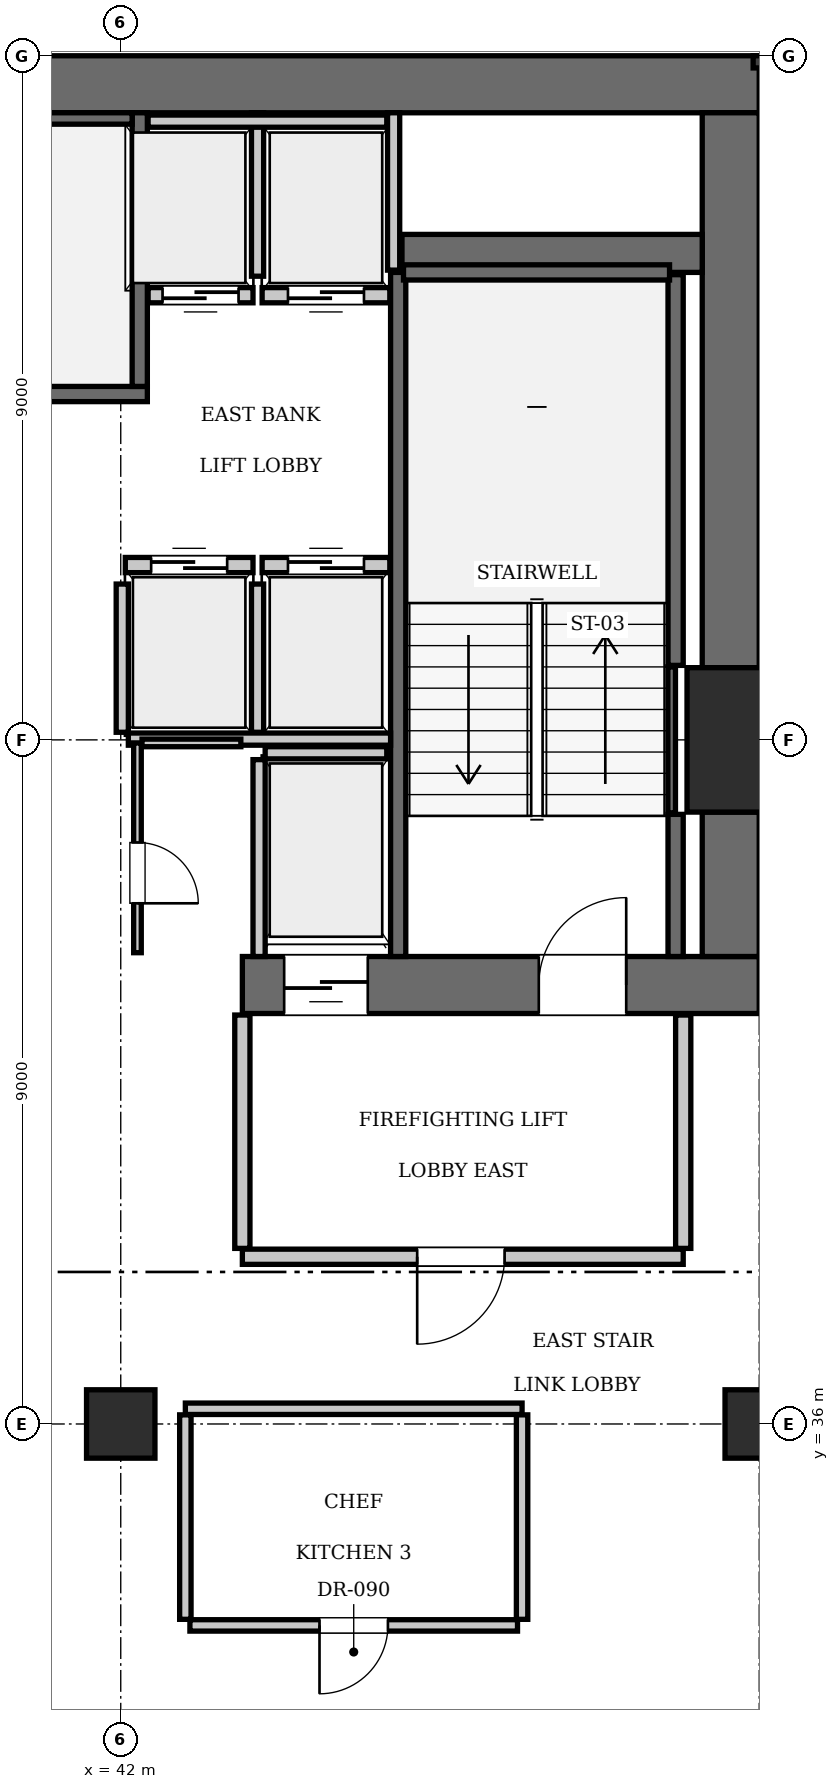
"""IFC4 building model, lengths in metres.
Left out: names, types, materials, properties, quantities, classifications, styles, units other than length and angle.
Written with IfcOpenShell. Run it as: python <this file> out.ifc"""

import sys

from ifc_helpers import new_model, si_unit, direction, frame, frame_2d, origin, origin_2d, place, context, subcontext, project, spatial, rectangle, extrude, element, fill, save


model = new_model("IFC4")
c1 = context("Model", 3, precision=1e-05, world=origin(), true_north=direction((0.0, 1.0)))
c2 = subcontext(c1, "Body", "Model", "MODEL_VIEW")
j1 = project(units=[si_unit("LENGTHUNIT", "METRE"), si_unit("PLANEANGLEUNIT", "RADIAN")], contexts=[c1])
p1 = place(None, origin())
s1 = spatial("IfcSite", under=j1, at=p1, CompositionType="ELEMENT")
p2 = place(p1, origin())
s2 = spatial("IfcBuilding", under=s1, at=p2, CompositionType="ELEMENT")
p3 = place(p2, frame((0.0, 0.0, 165.9)))
s3 = spatial("IfcBuildingStorey", under=s2, at=p3, CompositionType="ELEMENT", Elevation=165.9)
p4 = place(p3, frame((50.4, 45.0, 0.0), z_axis=(0.0, 0.0, 1.0), x_axis=(1.0, 0.0, 0.0)))
e1 = element("IfcColumn", 1, at=p4, inside=s3, PredefinedType="COLUMN", context=c2, shape_type="SweptSolid", body=[
    extrude(rectangle(XDim=1.9, YDim=1.9, at=origin_2d()), origin(), (0.0, 0.0, 1.0), 3.85),
])
p5 = place(p3, frame((25.2, 53.625, 0.0), z_axis=(0.0, 0.0, 1.0), x_axis=(1.0, 0.0, 0.0)))
e2 = element("IfcWall", 2, at=p5, inside=s3, PredefinedType="SHEAR", context=c2, shape_type="SweptSolid", body=[
    extrude(rectangle(XDim=25.2, YDim=0.75, at=frame_2d((12.6, 0.0))), origin(), (0.0, 0.0, 1.0), 3.85),
])
p6 = place(p3, frame((43.6, 41.775, 0.0), z_axis=(0.0, 0.0, 1.0), x_axis=(1.0, 0.0, 0.0)))
e3 = element("IfcWall", 3, at=p6, inside=s3, PredefinedType="SHEAR", context=c2, shape_type="SweptSolid", body=[
    extrude(rectangle(XDim=6.8, YDim=0.75, at=frame_2d((3.4, 0.0))), origin(), (0.0, 0.0, 1.0), 3.85),
])
p7 = place(p6, frame((3.9, 0.0, 0.0)))
e4 = element("IfcOpeningElement", 4, at=p7, cuts=e3, PredefinedType="OPENING", context=c2, shape_type="SweptSolid", body=[
    extrude(rectangle(XDim=1.15, YDim=2.15, at=frame_2d((0.575, 1.075))), frame((0.0, 0.385, 0.0), z_axis=(0.0, -1.0, 0.0), x_axis=(1.0, 0.0, 0.0)), (0.0, 0.0, 1.0), 0.77),
])
p8 = place(p6, frame((0.55, 0.0, 0.0)))
e5 = element("IfcOpeningElement", 5, at=p8, cuts=e3, PredefinedType="OPENING", context=c2, shape_type="SweptSolid", body=[
    extrude(rectangle(XDim=1.1, YDim=2.2, at=frame_2d((0.55, 1.1))), frame((0.0, 0.385, 0.0), z_axis=(0.0, -1.0, 0.0), x_axis=(1.0, 0.0, 0.0)), (0.0, 0.0, 1.0), 0.77),
])
p9 = place(p3, frame((50.025, 42.15, 0.0), z_axis=(0.0, 0.0, 1.0), x_axis=(0.0, 1.0, 0.0)))
e6 = element("IfcWall", 6, at=p9, inside=s3, PredefinedType="SHEAR", context=c2, shape_type="SweptSolid", body=[
    extrude(rectangle(XDim=1.9, YDim=0.75, at=frame_2d((0.95, 0.0))), origin(), (0.0, 0.0, 1.0), 3.85),
])
p10 = place(p3, frame((50.025, 45.95, 0.0), z_axis=(0.0, 0.0, 1.0), x_axis=(0.0, 1.0, 0.0)))
e7 = element("IfcWall", 7, at=p10, inside=s3, PredefinedType="SHEAR", context=c2, shape_type="SweptSolid", body=[
    extrude(rectangle(XDim=7.3, YDim=0.75, at=frame_2d((3.65, 0.0))), origin(), (0.0, 0.0, 1.0), 3.85),
])
p11 = place(p3, frame((45.7, 51.4, 0.0), z_axis=(0.0, 0.0, 1.0), x_axis=(1.0, 0.0, 0.0)))
e8 = element("IfcWall", 8, at=p11, inside=s3, PredefinedType="SHEAR", context=c2, shape_type="SweptSolid", body=[
    extrude(rectangle(XDim=3.95, YDim=0.5, at=frame_2d((1.975, 0.0))), origin(), (0.0, 0.0, 1.0), 3.85),
])
for number, where, z_axis, x_axis in (
    (9, (42.0, 36.0, 0.0), (0.0, 0.0, 1.0), (1.0, 0.0, 0.0)),
    (10, (50.4, 36.0, 0.0), (0.0, 0.0, 1.0), (1.0, 0.0, 0.0)),
):
    element("IfcColumn", number, at=place(p3, frame(where, z_axis=z_axis, x_axis=x_axis)), inside=s3, PredefinedType="COLUMN", context=c2, shape_type="SweptSolid", body=[
        extrude(rectangle(XDim=0.9, YDim=0.9, at=origin_2d()), origin(), (0.0, 0.0, 1.0), 3.85),
    ])
p12 = place(p3, frame((33.25, 49.55, 0.0), z_axis=(0.0, 0.0, 1.0), x_axis=(1.0, 0.0, 0.0)))
e11 = element("IfcWall", 11, at=p12, inside=s3, PredefinedType="SOLIDWALL", context=c2, shape_type="SweptSolid", body=[
    extrude(rectangle(XDim=9.1, YDim=0.2, at=frame_2d((4.55, 0.0))), origin(), (0.0, 0.0, 1.0), 3.61),
])
p13 = place(p3, frame((42.25, 49.65, 0.0), z_axis=(0.0, 0.0, 1.0), x_axis=(0.0, 1.0, 0.0)))
e12 = element("IfcWall", 12, at=p13, inside=s3, PredefinedType="SOLIDWALL", context=c2, shape_type="SweptSolid", body=[
    extrude(rectangle(XDim=3.6, YDim=0.2, at=frame_2d((1.8, 0.0))), origin(), (0.0, 0.0, 1.0), 3.61),
])
p14 = place(p3, frame((33.45, 53.175, 0.0), z_axis=(0.0, 0.0, 1.0), x_axis=(1.0, 0.0, 0.0)))
e13 = element("IfcWall", 13, at=p14, inside=s3, PredefinedType="SOLIDWALL", context=c2, shape_type="SweptSolid", body=[
    extrude(rectangle(XDim=8.7, YDim=0.15, at=frame_2d((4.35, 0.0))), origin(), (0.0, 0.0, 1.0), 3.61),
])
p15 = place(p3, frame((45.65, 42.15, 0.0), z_axis=(0.0, 0.0, 1.0), x_axis=(0.0, 1.0, 0.0)))
e14 = element("IfcWall", 14, at=p15, inside=s3, PredefinedType="SOLIDWALL", context=c2, shape_type="SweptSolid", body=[
    extrude(rectangle(XDim=9.0, YDim=0.2, at=frame_2d((4.5, 0.0))), origin(), (0.0, 0.0, 1.0), 3.61),
])
p16 = place(p3, frame((49.3, 42.15, 0.0), z_axis=(0.0, 0.0, 1.0), x_axis=(0.0, 1.0, 0.0)))
e15 = element("IfcWall", 15, at=p16, inside=s3, PredefinedType="SOLIDWALL", context=c2, shape_type="SweptSolid", body=[
    extrude(rectangle(XDim=1.87, YDim=0.2, at=frame_2d((0.935, 0.0))), origin(), (0.0, 0.0, 1.0), 3.61),
])
p17 = place(p3, frame((49.3, 45.98, 0.0), z_axis=(0.0, 0.0, 1.0), x_axis=(0.0, 1.0, 0.0)))
e16 = element("IfcWall", 16, at=p17, inside=s3, PredefinedType="SOLIDWALL", context=c2, shape_type="SweptSolid", body=[
    extrude(rectangle(XDim=5.14, YDim=0.2, at=frame_2d((2.57, 0.0))), origin(), (0.0, 0.0, 1.0), 3.61),
])
p18 = place(p3, frame((45.72, 51.15, 0.0), z_axis=(0.0, 0.0, 1.0), x_axis=(1.0, 0.0, 0.0)))
e17 = element("IfcWall", 17, at=p18, inside=s3, PredefinedType="SOLIDWALL", context=c2, shape_type="SweptSolid", body=[
    extrude(rectangle(XDim=3.5, YDim=0.2, at=frame_2d((1.75, 0.0))), origin(), (0.0, 0.0, 1.0), 3.61),
])
p19 = place(p3, frame((49.248, 44.04, 0.0), z_axis=(0.0, 0.0, 1.0), x_axis=(0.0, 1.0, 0.0)))
e18 = element("IfcWall", 18, at=p19, inside=s3, PredefinedType="SOLIDWALL", context=c2, shape_type="SweptSolid", body=[
    extrude(rectangle(XDim=1.92, YDim=0.1, at=frame_2d((0.96, 0.0))), origin(), (0.0, 0.0, 1.0), 3.61),
])
p20 = place(p3, frame((42.06, 47.3, 0.0), z_axis=(0.0, 0.0, 1.0), x_axis=(1.0, 0.0, 0.0)))
e19 = element("IfcWall", 19, at=p20, inside=s3, PredefinedType="SOLIDWALL", context=c2, shape_type="SweptSolid", body=[
    extrude(rectangle(XDim=1.68, YDim=0.2, at=frame_2d((0.84, 0.0))), origin(), (0.0, 0.0, 1.0), 3.61),
])
p21 = place(p20, frame((0.34, 0.0, 0.0)))
e20 = element("IfcOpeningElement", 20, at=p21, cuts=e19, PredefinedType="OPENING", context=c2, shape_type="SweptSolid", body=[
    extrude(rectangle(XDim=1.0, YDim=2.15, at=frame_2d((0.5, 1.075))), frame((0.0, 0.11, 0.0), z_axis=(0.0, -1.0, 0.0), x_axis=(1.0, 0.0, 0.0)), (0.0, 0.0, 1.0), 0.22),
])
p22 = place(p3, frame((43.86, 47.3, 0.0), z_axis=(0.0, 0.0, 1.0), x_axis=(1.0, 0.0, 0.0)))
e21 = element("IfcWall", 21, at=p22, inside=s3, PredefinedType="SOLIDWALL", context=c2, shape_type="SweptSolid", body=[
    extrude(rectangle(XDim=1.68, YDim=0.2, at=frame_2d((0.84, 0.0))), origin(), (0.0, 0.0, 1.0), 3.61),
])
p23 = place(p22, frame((0.34, 0.0, 0.0)))
e22 = element("IfcOpeningElement", 22, at=p23, cuts=e21, PredefinedType="OPENING", context=c2, shape_type="SweptSolid", body=[
    extrude(rectangle(XDim=1.0, YDim=2.15, at=frame_2d((0.5, 1.075))), frame((0.0, 0.11, 0.0), z_axis=(0.0, -1.0, 0.0), x_axis=(1.0, 0.0, 0.0)), (0.0, 0.0, 1.0), 0.22),
])
p24 = place(p3, frame((42.36, 50.85, 0.0), z_axis=(0.0, 0.0, 1.0), x_axis=(1.0, 0.0, 0.0)))
e23 = element("IfcWall", 23, at=p24, inside=s3, PredefinedType="SOLIDWALL", context=c2, shape_type="SweptSolid", body=[
    extrude(rectangle(XDim=1.38, YDim=0.2, at=frame_2d((0.69, 0.0))), origin(), (0.0, 0.0, 1.0), 3.61),
])
p25 = place(p24, frame((0.19, 0.0, 0.0)))
e24 = element("IfcOpeningElement", 24, at=p25, cuts=e23, PredefinedType="OPENING", context=c2, shape_type="SweptSolid", body=[
    extrude(rectangle(XDim=1.0, YDim=2.15, at=frame_2d((0.5, 1.075))), frame((0.0, 0.11, 0.0), z_axis=(0.0, -1.0, 0.0), x_axis=(1.0, 0.0, 0.0)), (0.0, 0.0, 1.0), 0.22),
])
p26 = place(p3, frame((43.86, 50.85, 0.0), z_axis=(0.0, 0.0, 1.0), x_axis=(1.0, 0.0, 0.0)))
e25 = element("IfcWall", 25, at=p26, inside=s3, PredefinedType="SOLIDWALL", context=c2, shape_type="SweptSolid", body=[
    extrude(rectangle(XDim=1.68, YDim=0.2, at=frame_2d((0.84, 0.0))), origin(), (0.0, 0.0, 1.0), 3.61),
])
p27 = place(p26, frame((0.34, 0.0, 0.0)))
e26 = element("IfcOpeningElement", 26, at=p27, cuts=e25, PredefinedType="OPENING", context=c2, shape_type="SweptSolid", body=[
    extrude(rectangle(XDim=1.0, YDim=2.15, at=frame_2d((0.5, 1.075))), frame((0.0, 0.11, 0.0), z_axis=(0.0, -1.0, 0.0), x_axis=(1.0, 0.0, 0.0)), (0.0, 0.0, 1.0), 0.22),
])
p28 = place(p3, frame((43.9, 44.83, 0.0), z_axis=(0.0, 0.0, 1.0), x_axis=(1.0, 0.0, 0.0)))
e27 = element("IfcWall", 27, at=p28, inside=s3, PredefinedType="SOLIDWALL", context=c2, shape_type="SweptSolid", body=[
    extrude(rectangle(XDim=1.6, YDim=0.16, at=frame_2d((0.8, 0.0))), origin(), (0.0, 0.0, 1.0), 3.61),
])
p29 = place(p3, frame((43.82, 42.15, 0.0), z_axis=(0.0, 0.0, 1.0), x_axis=(0.0, 1.0, 0.0)))
e28 = element("IfcWall", 28, at=p29, inside=s3, PredefinedType="SOLIDWALL", context=c2, shape_type="SweptSolid", body=[
    extrude(rectangle(XDim=2.59, YDim=0.16, at=frame_2d((1.295, 0.0))), origin(), (0.0, 0.0, 1.0), 3.61),
])
for number, where, z_axis, x_axis in (
    (29, (42.02, 45.1, 0.0), (0.0, 0.0, 1.0), (0.0, 1.0, 0.0)),
    (30, (43.8, 45.1, 0.0), (0.0, 0.0, 1.0), (0.0, 1.0, 0.0)),
):
    element("IfcWall", number, at=place(p3, frame(where, z_axis=z_axis, x_axis=x_axis)), inside=s3, PredefinedType="SOLIDWALL", context=c2, shape_type="SweptSolid", body=[
        extrude(rectangle(XDim=1.95, YDim=0.16, at=frame_2d((0.975, 0.0))), origin(), (0.0, 0.0, 1.0), 3.61),
    ])
p30 = place(p3, frame((42.1, 45.01, 0.0), z_axis=(0.0, 0.0, 1.0), x_axis=(1.0, 0.0, 0.0)))
e31 = element("IfcWall", 31, at=p30, inside=s3, PredefinedType="SOLIDWALL", context=c2, shape_type="SweptSolid", body=[
    extrude(rectangle(XDim=3.45, YDim=0.16, at=frame_2d((1.725, 0.0))), origin(), (0.0, 0.0, 1.0), 3.61),
])
p31 = place(p3, frame((45.59, 51.18, 0.0), z_axis=(0.0, 0.0, 1.0), x_axis=(0.0, 1.0, 0.0)))
e32 = element("IfcWall", 32, at=p31, inside=s3, PredefinedType="SOLIDWALL", context=c2, shape_type="SweptSolid", body=[
    extrude(rectangle(XDim=2.07, YDim=0.16, at=frame_2d((1.035, 0.0))), origin(), (0.0, 0.0, 1.0), 3.61),
])
p32 = place(p3, frame((43.8, 51.1, 0.0), z_axis=(0.0, 0.0, 1.0), x_axis=(0.0, 1.0, 0.0)))
e33 = element("IfcWall", 33, at=p32, inside=s3, PredefinedType="SOLIDWALL", context=c2, shape_type="SweptSolid", body=[
    extrude(rectangle(XDim=2.15, YDim=0.16, at=frame_2d((1.075, 0.0))), origin(), (0.0, 0.0, 1.0), 3.61),
])
p33 = place(p3, frame((42.36, 53.14, 0.0), z_axis=(0.0, 0.0, 1.0), x_axis=(1.0, 0.0, 0.0)))
e34 = element("IfcWall", 34, at=p33, inside=s3, PredefinedType="SOLIDWALL", context=c2, shape_type="SweptSolid", body=[
    extrude(rectangle(XDim=3.14, YDim=0.16, at=frame_2d((1.57, 0.0))), origin(), (0.0, 0.0, 1.0), 3.61),
])
p34 = place(p3, frame((43.6, 38.2, 0.0), z_axis=(0.0, 0.0, 1.0), x_axis=(1.0, 0.0, 0.0)))
e35 = element("IfcWall", 35, at=p34, inside=s3, PredefinedType="PARTITIONING", context=c2, shape_type="SweptSolid", body=[
    extrude(rectangle(XDim=5.8, YDim=0.2, at=frame_2d((2.9, 0.0))), origin(), (0.0, 0.0, 1.0), 3.61),
])
p35 = place(p34, frame((2.3, 0.0, 0.0)))
e36 = element("IfcOpeningElement", 36, at=p35, cuts=e35, PredefinedType="OPENING", context=c2, shape_type="SweptSolid", body=[
    extrude(rectangle(XDim=1.15, YDim=2.15, at=frame_2d((0.575, 1.075))), frame((0.0, 0.11, 0.0), z_axis=(0.0, -1.0, 0.0), x_axis=(1.0, 0.0, 0.0)), (0.0, 0.0, 1.0), 0.22),
])
for number, where, z_axis, x_axis in (
    (37, (43.6, 38.31, 0.0), (0.0, 0.0, 1.0), (0.0, 1.0, 0.0)),
    (38, (49.4, 38.31, 0.0), (0.0, 0.0, 1.0), (0.0, 1.0, 0.0)),
):
    element("IfcWall", number, at=place(p3, frame(where, z_axis=z_axis, x_axis=x_axis)), inside=s3, PredefinedType="PARTITIONING", context=c2, shape_type="SweptSolid", body=[
        extrude(rectangle(XDim=3.07, YDim=0.2, at=frame_2d((1.535, 0.0))), origin(), (0.0, 0.0, 1.0), 3.61),
    ])
p36 = place(p3, frame((42.22, 42.2, 0.0), z_axis=(0.0, 0.0, 1.0), x_axis=(0.0, 1.0, 0.0)))
e39 = element("IfcWall", 39, at=p36, inside=s3, PredefinedType="PARTITIONING", context=c2, shape_type="SweptSolid", body=[
    extrude(rectangle(XDim=2.76, YDim=0.1, at=frame_2d((1.38, 0.0))), origin(), (0.0, 0.0, 1.0), 3.61),
])
p37 = place(p36, frame((0.65, 0.0, 0.0)))
e40 = element("IfcOpeningElement", 40, at=p37, cuts=e39, PredefinedType="OPENING", context=c2, shape_type="SweptSolid", body=[
    extrude(rectangle(XDim=0.8, YDim=2.05, at=frame_2d((0.4, 1.025))), frame((0.0, 0.06, 0.0), z_axis=(0.0, -1.0, 0.0), x_axis=(1.0, 0.0, 0.0)), (0.0, 0.0, 1.0), 0.12),
])
p38 = place(p3, frame((42.28, 44.96, 0.0), z_axis=(0.0, 0.0, 1.0), x_axis=(1.0, 0.0, 0.0)))
e41 = element("IfcWall", 41, at=p38, inside=s3, PredefinedType="PARTITIONING", context=c2, shape_type="SweptSolid", body=[
    extrude(rectangle(XDim=1.3, YDim=0.1, at=frame_2d((0.65, 0.0))), origin(), (0.0, 0.0, 1.0), 3.61),
])
p39 = place(p3, frame((42.85, 36.2, 0.0), z_axis=(0.0, 0.0, 1.0), x_axis=(1.0, 0.0, 0.0)))
e42 = element("IfcWall", 42, at=p39, inside=s3, PredefinedType="PARTITIONING", context=c2, shape_type="SweptSolid", body=[
    extrude(rectangle(XDim=4.43, YDim=0.15, at=frame_2d((2.215, 0.0))), origin(), (0.0, 0.0, 1.0), 3.61),
])
for number, where, z_axis, x_axis in (
    (43, (42.85, 33.43, 0.0), (0.0, 0.0, 1.0), (0.0, 1.0, 0.0)),
    (44, (47.28, 33.43, 0.0), (0.0, 0.0, 1.0), (0.0, 1.0, 0.0)),
):
    element("IfcWall", number, at=place(p3, frame(where, z_axis=z_axis, x_axis=x_axis)), inside=s3, PredefinedType="PARTITIONING", context=c2, shape_type="SweptSolid", body=[
        extrude(rectangle(XDim=2.69, YDim=0.15, at=frame_2d((1.345, 0.0))), origin(), (0.0, 0.0, 1.0), 3.61),
    ])
p40 = place(p3, frame((42.91, 33.35, 0.0), z_axis=(0.0, 0.0, 1.0), x_axis=(1.0, 0.0, 0.0)))
e45 = element("IfcWall", 45, at=p40, inside=s3, PredefinedType="PARTITIONING", context=c2, shape_type="SweptSolid", body=[
    extrude(rectangle(XDim=4.31, YDim=0.15, at=frame_2d((2.155, 0.0))), origin(), (0.0, 0.0, 1.0), 3.61),
])
p41 = place(p40, frame((1.705, 0.0, 0.0)))
e46 = element("IfcOpeningElement", 46, at=p41, cuts=e45, PredefinedType="OPENING", context=c2, shape_type="SweptSolid", body=[
    extrude(rectangle(XDim=0.9, YDim=2.1, at=frame_2d((0.45, 1.05))), frame((0.0, 0.085, 0.0), z_axis=(0.0, -1.0, 0.0), x_axis=(1.0, 0.0, 0.0)), (0.0, 0.0, 1.0), 0.17),
])
p42 = place(p7, origin())
e47 = element("IfcDoor", 47, at=p42, inside=s3, OperationType="SINGLE_SWING_RIGHT", PredefinedType="DOOR", context=c2, shape_type="SweptSolid", body=[
    extrude(rectangle(XDim=1.15, YDim=2.15, at=frame_2d((0.575, 1.075))), frame((0.0, 0.025, 0.0), z_axis=(0.0, -1.0, 0.0), x_axis=(1.0, 0.0, 0.0)), (0.0, 0.0, 1.0), 0.05),
])
fill(e4, e47)
p43 = place(p21, origin())
e48 = element("IfcDoor", 48, at=p43, inside=s3, OperationType="SLIDING_TO_LEFT", PredefinedType="DOOR", context=c2, shape_type="SweptSolid", body=[
    extrude(rectangle(XDim=1.0, YDim=2.15, at=frame_2d((0.5, 1.075))), frame((0.0, 0.025, 0.0), z_axis=(0.0, -1.0, 0.0), x_axis=(1.0, 0.0, 0.0)), (0.0, 0.0, 1.0), 0.05),
])
fill(e20, e48)
p44 = place(p23, origin())
e49 = element("IfcDoor", 49, at=p44, inside=s3, OperationType="SLIDING_TO_LEFT", PredefinedType="DOOR", context=c2, shape_type="SweptSolid", body=[
    extrude(rectangle(XDim=1.0, YDim=2.15, at=frame_2d((0.5, 1.075))), frame((0.0, 0.025, 0.0), z_axis=(0.0, -1.0, 0.0), x_axis=(1.0, 0.0, 0.0)), (0.0, 0.0, 1.0), 0.05),
])
fill(e22, e49)
p45 = place(p25, frame((1.0, 0.0, 0.0), z_axis=(0.0, 0.0, 1.0), x_axis=(-1.0, 0.0, 0.0)))
e50 = element("IfcDoor", 50, at=p45, inside=s3, OperationType="SLIDING_TO_LEFT", PredefinedType="DOOR", context=c2, shape_type="SweptSolid", body=[
    extrude(rectangle(XDim=1.0, YDim=2.15, at=frame_2d((0.5, 1.075))), frame((0.0, 0.025, 0.0), z_axis=(0.0, -1.0, 0.0), x_axis=(1.0, 0.0, 0.0)), (0.0, 0.0, 1.0), 0.05),
])
fill(e24, e50)
p46 = place(p27, frame((1.0, 0.0, 0.0), z_axis=(0.0, 0.0, 1.0), x_axis=(-1.0, 0.0, 0.0)))
e51 = element("IfcDoor", 51, at=p46, inside=s3, OperationType="SLIDING_TO_LEFT", PredefinedType="DOOR", context=c2, shape_type="SweptSolid", body=[
    extrude(rectangle(XDim=1.0, YDim=2.15, at=frame_2d((0.5, 1.075))), frame((0.0, 0.025, 0.0), z_axis=(0.0, -1.0, 0.0), x_axis=(1.0, 0.0, 0.0)), (0.0, 0.0, 1.0), 0.05),
])
fill(e26, e51)
p47 = place(p8, frame((1.1, 0.0, 0.0), z_axis=(0.0, 0.0, 1.0), x_axis=(-1.0, 0.0, 0.0)))
e52 = element("IfcDoor", 52, at=p47, inside=s3, OperationType="SLIDING_TO_LEFT", PredefinedType="DOOR", context=c2, shape_type="SweptSolid", body=[
    extrude(rectangle(XDim=1.1, YDim=2.2, at=frame_2d((0.55, 1.1))), frame((0.0, 0.025, 0.0), z_axis=(0.0, -1.0, 0.0), x_axis=(1.0, 0.0, 0.0)), (0.0, 0.0, 1.0), 0.05),
])
fill(e5, e52)
p48 = place(p35, frame((1.15, 0.0, 0.0), z_axis=(0.0, 0.0, 1.0), x_axis=(-1.0, 0.0, 0.0)))
e53 = element("IfcDoor", 53, at=p48, inside=s3, OperationType="SINGLE_SWING_RIGHT", PredefinedType="DOOR", context=c2, shape_type="SweptSolid", body=[
    extrude(rectangle(XDim=1.15, YDim=2.15, at=frame_2d((0.575, 1.075))), frame((0.0, 0.025, 0.0), z_axis=(0.0, -1.0, 0.0), x_axis=(1.0, 0.0, 0.0)), (0.0, 0.0, 1.0), 0.05),
])
fill(e36, e53)
p49 = place(p37, frame((0.8, 0.0, 0.0), z_axis=(0.0, 0.0, 1.0), x_axis=(-1.0, 0.0, 0.0)))
e54 = element("IfcDoor", 54, at=p49, inside=s3, OperationType="SINGLE_SWING_RIGHT", PredefinedType="DOOR", context=c2, shape_type="SweptSolid", body=[
    extrude(rectangle(XDim=0.8, YDim=2.05, at=frame_2d((0.4, 1.025))), frame((0.0, 0.025, 0.0), z_axis=(0.0, -1.0, 0.0), x_axis=(1.0, 0.0, 0.0)), (0.0, 0.0, 1.0), 0.05),
])
fill(e40, e54)
p50 = place(p41, frame((0.9, 0.0, 0.0), z_axis=(0.0, 0.0, 1.0), x_axis=(-1.0, 0.0, 0.0)))
e55 = element("IfcDoor", 55, at=p50, inside=s3, OperationType="SINGLE_SWING_RIGHT", PredefinedType="DOOR", context=c2, shape_type="SweptSolid", body=[
    extrude(rectangle(XDim=0.9, YDim=2.1, at=frame_2d((0.45, 1.05))), frame((0.0, 0.025, 0.0), z_axis=(0.0, -1.0, 0.0), x_axis=(1.0, 0.0, 0.0)), (0.0, 0.0, 1.0), 0.05),
])
fill(e46, e55)
save(model, sys.argv[1])
